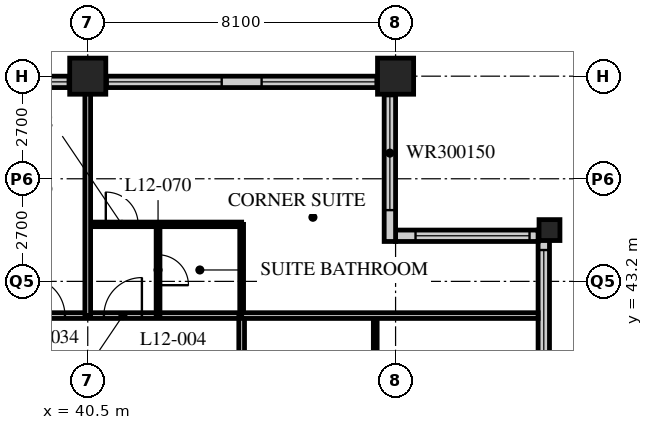
"""IFC4 building model, lengths in metres.
Left out: names, types, materials, properties, quantities, classifications, styles, units other than length and angle.
Written with IfcOpenShell. Run it as: python <this file> out.ifc"""

import sys

from ifc_helpers import new_model, si_unit, direction, frame, frame_2d, origin, origin_2d, place, context, subcontext, project, spatial, rectangle, hollow_rectangle, extrude, element, fill, save


model = new_model("IFC4")
c1 = context("Model", 3, precision=1e-05, world=origin(), true_north=direction((0.0, 1.0)))
c2 = subcontext(c1, "Body", "Model", "MODEL_VIEW")
j1 = project(units=[si_unit("LENGTHUNIT", "METRE"), si_unit("PLANEANGLEUNIT", "RADIAN")], contexts=[c1])
p1 = place(None, origin())
s1 = spatial("IfcSite", under=j1, at=p1, CompositionType="ELEMENT")
p2 = place(p1, origin())
s2 = spatial("IfcBuilding", under=s1, at=p2, CompositionType="ELEMENT")
p3 = place(p2, frame((0.0, 0.0, 53.4)))
s3 = spatial("IfcBuildingStorey", under=s2, at=p3, CompositionType="ELEMENT", Elevation=53.4)
for number, where, z_axis, x_axis in (
    (1, (40.5, 48.6, 0.0), (0.0, 0.0, 1.0), (1.0, 0.0, 0.0)),
    (2, (48.6, 48.6, 0.0), (0.0, 0.0, 1.0), (1.0, 0.0, 0.0)),
):
    element("IfcColumn", number, at=place(p3, frame(where, z_axis=z_axis, x_axis=x_axis)), inside=s3, PredefinedType="COLUMN", context=c2, shape_type="SweptSolid", body=[
        extrude(hollow_rectangle(XDim=0.95, YDim=0.95, WallThickness=0.095, at=origin_2d()), origin(), (0.0, 0.0, 1.0), 3.4),
    ])
p4 = place(p3, frame((52.65, 44.55, 0.0), z_axis=(0.0, 0.0, 1.0), x_axis=(1.0, 0.0, 0.0)))
e3 = element("IfcColumn", 3, at=p4, inside=s3, PredefinedType="COLUMN", context=c2, shape_type="SweptSolid", body=[
    extrude(hollow_rectangle(XDim=0.55, YDim=0.55, WallThickness=0.05, at=origin_2d()), origin(), (0.0, 0.0, 1.0), 3.4),
])
p5 = place(p3, frame((52.5, 40.2, 0.0), z_axis=(0.0, 0.0, 1.0), x_axis=(0.0, 1.0, 0.0)))
e4 = element("IfcWall", 4, at=p5, inside=s3, PredefinedType="SOLIDWALL", context=c2, shape_type="SweptSolid", body=[
    extrude(rectangle(XDim=4.35, YDim=0.3, at=frame_2d((2.175, 0.0))), origin(), (0.0, 0.0, 1.0), 3.19),
])
p6 = place(p5, frame((0.825, 0.0, 0.9)))
e5 = element("IfcOpeningElement", 5, at=p6, cuts=e4, PredefinedType="OPENING", context=c2, shape_type="SweptSolid", body=[
    extrude(rectangle(XDim=3.0, YDim=1.5, at=frame_2d((1.5, 0.75))), frame((0.0, 0.16, 0.0), z_axis=(0.0, -1.0, 0.0), x_axis=(1.0, 0.0, 0.0)), (0.0, 0.0, 1.0), 0.32),
])
p7 = place(p3, frame((52.35, 44.4, 0.0), z_axis=(0.0, 0.0, 1.0), x_axis=(-1.0, 0.0, 0.0)))
e6 = element("IfcWall", 6, at=p7, inside=s3, PredefinedType="SOLIDWALL", context=c2, shape_type="SweptSolid", body=[
    extrude(rectangle(XDim=3.75, YDim=0.3, at=frame_2d((1.875, 0.0))), origin(), (0.0, 0.0, 1.0), 3.19),
])
p8 = place(p7, frame((0.225, 0.0, 0.9)))
e7 = element("IfcOpeningElement", 7, at=p8, cuts=e6, PredefinedType="OPENING", context=c2, shape_type="SweptSolid", body=[
    extrude(rectangle(XDim=3.0, YDim=1.5, at=frame_2d((1.5, 0.75))), frame((0.0, 0.16, 0.0), z_axis=(0.0, -1.0, 0.0), x_axis=(1.0, 0.0, 0.0)), (0.0, 0.0, 1.0), 0.32),
])
p9 = place(p3, frame((48.45, 44.25, 0.0), z_axis=(0.0, 0.0, 1.0), x_axis=(0.0, 1.0, 0.0)))
e8 = element("IfcWall", 8, at=p9, inside=s3, PredefinedType="SOLIDWALL", context=c2, shape_type="SweptSolid", body=[
    extrude(rectangle(XDim=4.35, YDim=0.3, at=frame_2d((2.175, 0.0))), origin(), (0.0, 0.0, 1.0), 3.19),
])
p10 = place(p9, frame((0.825, 0.0, 0.9)))
e9 = element("IfcOpeningElement", 9, at=p10, cuts=e8, PredefinedType="OPENING", context=c2, shape_type="SweptSolid", body=[
    extrude(rectangle(XDim=3.0, YDim=1.5, at=frame_2d((1.5, 0.75))), frame((0.0, 0.16, 0.0), z_axis=(0.0, -1.0, 0.0), x_axis=(1.0, 0.0, 0.0)), (0.0, 0.0, 1.0), 0.32),
])
p11 = place(p3, frame((48.3, 48.45, 0.0), z_axis=(0.0, 0.0, 1.0), x_axis=(-1.0, 0.0, 0.0)))
e10 = element("IfcWall", 10, at=p11, inside=s3, PredefinedType="SOLIDWALL", context=c2, shape_type="SweptSolid", body=[
    extrude(rectangle(XDim=40.2, YDim=0.3, at=frame_2d((20.1, 0.0))), origin(), (0.0, 0.0, 1.0), 3.19),
])
p12 = place(p11, frame((0.225, 0.0, 0.9)))
e11 = element("IfcOpeningElement", 11, at=p12, cuts=e10, PredefinedType="OPENING", context=c2, shape_type="SweptSolid", body=[
    extrude(rectangle(XDim=3.0, YDim=2.0, at=frame_2d((1.5, 1.0))), frame((0.0, 0.16, 0.0), z_axis=(0.0, -1.0, 0.0), x_axis=(1.0, 0.0, 0.0)), (0.0, 0.0, 1.0), 0.32),
])
p13 = place(p11, frame((4.275, 0.0, 0.9)))
e12 = element("IfcOpeningElement", 12, at=p13, cuts=e10, PredefinedType="OPENING", context=c2, shape_type="SweptSolid", body=[
    extrude(rectangle(XDim=3.0, YDim=2.0, at=frame_2d((1.5, 1.0))), frame((0.0, 0.16, 0.0), z_axis=(0.0, -1.0, 0.0), x_axis=(1.0, 0.0, 0.0)), (0.0, 0.0, 1.0), 0.32),
])
p14 = place(p11, frame((8.325, 0.0, 0.9)))
e13 = element("IfcOpeningElement", 13, at=p14, cuts=e10, PredefinedType="OPENING", context=c2, shape_type="SweptSolid", body=[
    extrude(rectangle(XDim=3.0, YDim=2.0, at=frame_2d((1.5, 1.0))), frame((0.0, 0.16, 0.0), z_axis=(0.0, -1.0, 0.0), x_axis=(1.0, 0.0, 0.0)), (0.0, 0.0, 1.0), 0.32),
])
p15 = place(p11, frame((12.375, 0.0, 0.9)))
e14 = element("IfcOpeningElement", 14, at=p15, cuts=e10, PredefinedType="OPENING", context=c2, shape_type="SweptSolid", body=[
    extrude(rectangle(XDim=3.0, YDim=2.0, at=frame_2d((1.5, 1.0))), frame((0.0, 0.16, 0.0), z_axis=(0.0, -1.0, 0.0), x_axis=(1.0, 0.0, 0.0)), (0.0, 0.0, 1.0), 0.32),
])
p16 = place(p11, frame((16.425, 0.0, 0.9)))
e15 = element("IfcOpeningElement", 15, at=p16, cuts=e10, PredefinedType="OPENING", context=c2, shape_type="SweptSolid", body=[
    extrude(rectangle(XDim=3.0, YDim=2.0, at=frame_2d((1.5, 1.0))), frame((0.0, 0.16, 0.0), z_axis=(0.0, -1.0, 0.0), x_axis=(1.0, 0.0, 0.0)), (0.0, 0.0, 1.0), 0.32),
])
p17 = place(p11, frame((20.475, 0.0, 0.9)))
e16 = element("IfcOpeningElement", 16, at=p17, cuts=e10, PredefinedType="OPENING", context=c2, shape_type="SweptSolid", body=[
    extrude(rectangle(XDim=3.0, YDim=2.0, at=frame_2d((1.5, 1.0))), frame((0.0, 0.16, 0.0), z_axis=(0.0, -1.0, 0.0), x_axis=(1.0, 0.0, 0.0)), (0.0, 0.0, 1.0), 0.32),
])
p18 = place(p11, frame((24.525, 0.0, 0.9)))
e17 = element("IfcOpeningElement", 17, at=p18, cuts=e10, PredefinedType="OPENING", context=c2, shape_type="SweptSolid", body=[
    extrude(rectangle(XDim=3.0, YDim=2.0, at=frame_2d((1.5, 1.0))), frame((0.0, 0.16, 0.0), z_axis=(0.0, -1.0, 0.0), x_axis=(1.0, 0.0, 0.0)), (0.0, 0.0, 1.0), 0.32),
])
p19 = place(p11, frame((28.575, 0.0, 0.9)))
e18 = element("IfcOpeningElement", 18, at=p19, cuts=e10, PredefinedType="OPENING", context=c2, shape_type="SweptSolid", body=[
    extrude(rectangle(XDim=3.0, YDim=2.0, at=frame_2d((1.5, 1.0))), frame((0.0, 0.16, 0.0), z_axis=(0.0, -1.0, 0.0), x_axis=(1.0, 0.0, 0.0)), (0.0, 0.0, 1.0), 0.32),
])
p20 = place(p11, frame((32.625, 0.0, 0.9)))
e19 = element("IfcOpeningElement", 19, at=p20, cuts=e10, PredefinedType="OPENING", context=c2, shape_type="SweptSolid", body=[
    extrude(rectangle(XDim=3.0, YDim=2.0, at=frame_2d((1.5, 1.0))), frame((0.0, 0.16, 0.0), z_axis=(0.0, -1.0, 0.0), x_axis=(1.0, 0.0, 0.0)), (0.0, 0.0, 1.0), 0.32),
])
p21 = place(p11, frame((36.675, 0.0, 0.9)))
e20 = element("IfcOpeningElement", 20, at=p21, cuts=e10, PredefinedType="OPENING", context=c2, shape_type="SweptSolid", body=[
    extrude(rectangle(XDim=3.0, YDim=2.0, at=frame_2d((1.5, 1.0))), frame((0.0, 0.16, 0.0), z_axis=(0.0, -1.0, 0.0), x_axis=(1.0, 0.0, 0.0)), (0.0, 0.0, 1.0), 0.32),
])
p22 = place(p3, frame((12.15, 42.3, 0.0), z_axis=(0.0, 0.0, 1.0), x_axis=(1.0, 0.0, 0.0)))
e21 = element("IfcWall", 21, at=p22, inside=s3, PredefinedType="PARTITIONING", context=c2, shape_type="SweptSolid", body=[
    extrude(rectangle(XDim=32.4, YDim=0.15, at=frame_2d((16.2, 0.0))), origin(), (0.0, 0.0, 1.0), 3.19),
])
p23 = place(p22, frame((6.5, 0.0, 0.0)))
e22 = element("IfcOpeningElement", 22, at=p23, cuts=e21, PredefinedType="OPENING", context=c2, shape_type="SweptSolid", body=[
    extrude(rectangle(XDim=1.0, YDim=2.1, at=frame_2d((0.5, 1.05))), frame((0.0, 0.085, 0.0), z_axis=(0.0, -1.0, 0.0), x_axis=(1.0, 0.0, 0.0)), (0.0, 0.0, 1.0), 0.17),
])
p24 = place(p22, frame((10.55, 0.0, 0.0)))
e23 = element("IfcOpeningElement", 23, at=p24, cuts=e21, PredefinedType="OPENING", context=c2, shape_type="SweptSolid", body=[
    extrude(rectangle(XDim=1.0, YDim=2.1, at=frame_2d((0.5, 1.05))), frame((0.0, 0.085, 0.0), z_axis=(0.0, -1.0, 0.0), x_axis=(1.0, 0.0, 0.0)), (0.0, 0.0, 1.0), 0.17),
])
p25 = place(p22, frame((14.6, 0.0, 0.0)))
e24 = element("IfcOpeningElement", 24, at=p25, cuts=e21, PredefinedType="OPENING", context=c2, shape_type="SweptSolid", body=[
    extrude(rectangle(XDim=1.0, YDim=2.1, at=frame_2d((0.5, 1.05))), frame((0.0, 0.085, 0.0), z_axis=(0.0, -1.0, 0.0), x_axis=(1.0, 0.0, 0.0)), (0.0, 0.0, 1.0), 0.17),
])
p26 = place(p22, frame((18.65, 0.0, 0.0)))
e25 = element("IfcOpeningElement", 25, at=p26, cuts=e21, PredefinedType="OPENING", context=c2, shape_type="SweptSolid", body=[
    extrude(rectangle(XDim=1.0, YDim=2.1, at=frame_2d((0.5, 1.05))), frame((0.0, 0.085, 0.0), z_axis=(0.0, -1.0, 0.0), x_axis=(1.0, 0.0, 0.0)), (0.0, 0.0, 1.0), 0.17),
])
p27 = place(p22, frame((22.7, 0.0, 0.0)))
e26 = element("IfcOpeningElement", 26, at=p27, cuts=e21, PredefinedType="OPENING", context=c2, shape_type="SweptSolid", body=[
    extrude(rectangle(XDim=1.0, YDim=2.1, at=frame_2d((0.5, 1.05))), frame((0.0, 0.085, 0.0), z_axis=(0.0, -1.0, 0.0), x_axis=(1.0, 0.0, 0.0)), (0.0, 0.0, 1.0), 0.17),
])
p28 = place(p22, frame((26.75, 0.0, 0.0)))
e27 = element("IfcOpeningElement", 27, at=p28, cuts=e21, PredefinedType="OPENING", context=c2, shape_type="SweptSolid", body=[
    extrude(rectangle(XDim=1.0, YDim=2.1, at=frame_2d((0.5, 1.05))), frame((0.0, 0.085, 0.0), z_axis=(0.0, -1.0, 0.0), x_axis=(1.0, 0.0, 0.0)), (0.0, 0.0, 1.0), 0.17),
])
p29 = place(p22, frame((28.775, 0.0, 0.0)))
e28 = element("IfcOpeningElement", 28, at=p29, cuts=e21, PredefinedType="OPENING", context=c2, shape_type="SweptSolid", body=[
    extrude(rectangle(XDim=1.0, YDim=2.1, at=frame_2d((0.5, 1.05))), frame((0.0, 0.085, 0.0), z_axis=(0.0, -1.0, 0.0), x_axis=(1.0, 0.0, 0.0)), (0.0, 0.0, 1.0), 0.17),
])
p30 = place(p22, frame((2.625, 0.0, 0.0)))
e29 = element("IfcOpeningElement", 29, at=p30, cuts=e21, PredefinedType="OPENING", context=c2, shape_type="SweptSolid", body=[
    extrude(rectangle(XDim=1.0, YDim=2.1, at=frame_2d((0.5, 1.05))), frame((0.0, 0.085, 0.0), z_axis=(0.0, -1.0, 0.0), x_axis=(1.0, 0.0, 0.0)), (0.0, 0.0, 1.0), 0.17),
])
p31 = place(p3, frame((44.55, 12.15, 0.0), z_axis=(0.0, 0.0, 1.0), x_axis=(0.0, 1.0, 0.0)))
e30 = element("IfcWall", 30, at=p31, inside=s3, PredefinedType="PARTITIONING", context=c2, shape_type="SweptSolid", body=[
    extrude(rectangle(XDim=30.15, YDim=0.15, at=frame_2d((15.075, 0.0))), origin(), (0.0, 0.0, 1.0), 3.19),
])
p32 = place(p31, frame((2.75, 0.0, 0.0)))
e31 = element("IfcOpeningElement", 31, at=p32, cuts=e30, PredefinedType="OPENING", context=c2, shape_type="SweptSolid", body=[
    extrude(rectangle(XDim=1.0, YDim=2.1, at=frame_2d((0.5, 1.05))), frame((0.0, 0.085, 0.0), z_axis=(0.0, -1.0, 0.0), x_axis=(1.0, 0.0, 0.0)), (0.0, 0.0, 1.0), 0.17),
])
p33 = place(p31, frame((6.5, 0.0, 0.0)))
e32 = element("IfcOpeningElement", 32, at=p33, cuts=e30, PredefinedType="OPENING", context=c2, shape_type="SweptSolid", body=[
    extrude(rectangle(XDim=1.0, YDim=2.1, at=frame_2d((0.5, 1.05))), frame((0.0, 0.085, 0.0), z_axis=(0.0, -1.0, 0.0), x_axis=(1.0, 0.0, 0.0)), (0.0, 0.0, 1.0), 0.17),
])
p34 = place(p31, frame((10.55, 0.0, 0.0)))
e33 = element("IfcOpeningElement", 33, at=p34, cuts=e30, PredefinedType="OPENING", context=c2, shape_type="SweptSolid", body=[
    extrude(rectangle(XDim=1.0, YDim=2.1, at=frame_2d((0.5, 1.05))), frame((0.0, 0.085, 0.0), z_axis=(0.0, -1.0, 0.0), x_axis=(1.0, 0.0, 0.0)), (0.0, 0.0, 1.0), 0.17),
])
p35 = place(p31, frame((14.6, 0.0, 0.0)))
e34 = element("IfcOpeningElement", 34, at=p35, cuts=e30, PredefinedType="OPENING", context=c2, shape_type="SweptSolid", body=[
    extrude(rectangle(XDim=1.0, YDim=2.1, at=frame_2d((0.5, 1.05))), frame((0.0, 0.085, 0.0), z_axis=(0.0, -1.0, 0.0), x_axis=(1.0, 0.0, 0.0)), (0.0, 0.0, 1.0), 0.17),
])
p36 = place(p31, frame((18.65, 0.0, 0.0)))
e35 = element("IfcOpeningElement", 35, at=p36, cuts=e30, PredefinedType="OPENING", context=c2, shape_type="SweptSolid", body=[
    extrude(rectangle(XDim=1.0, YDim=2.1, at=frame_2d((0.5, 1.05))), frame((0.0, 0.085, 0.0), z_axis=(0.0, -1.0, 0.0), x_axis=(1.0, 0.0, 0.0)), (0.0, 0.0, 1.0), 0.17),
])
p37 = place(p31, frame((22.7, 0.0, 0.0)))
e36 = element("IfcOpeningElement", 36, at=p37, cuts=e30, PredefinedType="OPENING", context=c2, shape_type="SweptSolid", body=[
    extrude(rectangle(XDim=1.0, YDim=2.1, at=frame_2d((0.5, 1.05))), frame((0.0, 0.085, 0.0), z_axis=(0.0, -1.0, 0.0), x_axis=(1.0, 0.0, 0.0)), (0.0, 0.0, 1.0), 0.17),
])
p38 = place(p31, frame((26.7, 0.0, 0.0)))
e37 = element("IfcOpeningElement", 37, at=p38, cuts=e30, PredefinedType="OPENING", context=c2, shape_type="SweptSolid", body=[
    extrude(rectangle(XDim=1.0, YDim=2.1, at=frame_2d((0.5, 1.05))), frame((0.0, 0.085, 0.0), z_axis=(0.0, -1.0, 0.0), x_axis=(1.0, 0.0, 0.0)), (0.0, 0.0, 1.0), 0.17),
])
p39 = place(p3, frame((48.065, 40.0, 0.0), z_axis=(0.0, 0.0, 1.0), x_axis=(0.0, 1.0, 0.0)))
e38 = element("IfcWall", 38, at=p39, inside=s3, PredefinedType="PARTITIONING", context=c2, shape_type="SweptSolid", body=[
    extrude(rectangle(XDim=2.3, YDim=0.1, at=frame_2d((1.15, 0.0))), origin(), (0.0, 0.0, 1.0), 3.19),
])
p40 = place(p3, frame((40.5, 44.7, 0.0), z_axis=(0.0, 0.0, 1.0), x_axis=(1.0, 0.0, 0.0)))
e39 = element("IfcWall", 39, at=p40, inside=s3, PredefinedType="PARTITIONING", context=c2, shape_type="SweptSolid", body=[
    extrude(rectangle(XDim=4.05, YDim=0.12, at=frame_2d((2.025, 0.0))), origin(), (0.0, 0.0, 1.0), 3.19),
])
p41 = place(p40, frame((0.475, 0.0, 0.0)))
e40 = element("IfcOpeningElement", 40, at=p41, cuts=e39, PredefinedType="OPENING", context=c2, shape_type="SweptSolid", body=[
    extrude(rectangle(XDim=0.85, YDim=2.1, at=frame_2d((0.425, 1.05))), frame((0.0, 0.07, 0.0), z_axis=(0.0, -1.0, 0.0), x_axis=(1.0, 0.0, 0.0)), (0.0, 0.0, 1.0), 0.14),
])
p42 = place(p3, frame((42.35, 42.3, 0.0), z_axis=(0.0, 0.0, 1.0), x_axis=(0.0, 1.0, 0.0)))
e41 = element("IfcWall", 41, at=p42, inside=s3, PredefinedType="PARTITIONING", context=c2, shape_type="SweptSolid", body=[
    extrude(rectangle(XDim=2.4, YDim=0.1, at=frame_2d((1.2, 0.0))), origin(), (0.0, 0.0, 1.0), 3.19),
])
p43 = place(p42, frame((0.8, 0.0, 0.0)))
e42 = element("IfcOpeningElement", 42, at=p43, cuts=e41, PredefinedType="OPENING", context=c2, shape_type="SweptSolid", body=[
    extrude(rectangle(XDim=0.8, YDim=2.1, at=frame_2d((0.4, 1.05))), frame((0.0, 0.06, 0.0), z_axis=(0.0, -1.0, 0.0), x_axis=(1.0, 0.0, 0.0)), (0.0, 0.0, 1.0), 0.12),
])
p44 = place(p3, frame((44.55, 42.3, 0.0), z_axis=(0.0, 0.0, 1.0), x_axis=(0.0, 1.0, 0.0)))
e43 = element("IfcWall", 43, at=p44, inside=s3, PredefinedType="PARTITIONING", context=c2, shape_type="SweptSolid", body=[
    extrude(rectangle(XDim=2.4, YDim=0.1, at=frame_2d((1.2, 0.0))), origin(), (0.0, 0.0, 1.0), 3.19),
])
p45 = place(p3, frame((44.55, 42.3, 0.0), z_axis=(0.0, 0.0, 1.0), x_axis=(1.0, 0.0, 0.0)))
e44 = element("IfcWall", 44, at=p45, inside=s3, PredefinedType="PARTITIONING", context=c2, shape_type="SweptSolid", body=[
    extrude(rectangle(XDim=7.8, YDim=0.15, at=frame_2d((3.9, 0.0))), origin(), (0.0, 0.0, 1.0), 3.19),
])
p46 = place(p3, frame((40.5, 42.3, 0.0), z_axis=(0.0, 0.0, 1.0), x_axis=(0.0, 1.0, 0.0)))
e45 = element("IfcWall", 45, at=p46, inside=s3, PredefinedType="PARTITIONING", context=c2, shape_type="SweptSolid", body=[
    extrude(rectangle(XDim=6.0, YDim=0.15, at=frame_2d((3.0, 0.0))), origin(), (0.0, 0.0, 1.0), 2.578),
])
p47 = place(p6, origin())
e46 = element("IfcWindow", 46, at=p47, inside=s3, PartitioningType="SINGLE_PANEL", PredefinedType="WINDOW", context=c2, shape_type="SweptSolid", body=[
    extrude(rectangle(XDim=3.0, YDim=1.5, at=frame_2d((1.5, 0.75))), frame((0.0, 0.03, 0.0), z_axis=(0.0, -1.0, 0.0), x_axis=(1.0, 0.0, 0.0)), (0.0, 0.0, 1.0), 0.06),
])
fill(e5, e46)
p48 = place(p8, origin())
e47 = element("IfcWindow", 47, at=p48, inside=s3, PartitioningType="SINGLE_PANEL", PredefinedType="WINDOW", context=c2, shape_type="SweptSolid", body=[
    extrude(rectangle(XDim=3.0, YDim=1.5, at=frame_2d((1.5, 0.75))), frame((0.0, 0.03, 0.0), z_axis=(0.0, -1.0, 0.0), x_axis=(1.0, 0.0, 0.0)), (0.0, 0.0, 1.0), 0.06),
])
fill(e7, e47)
p49 = place(p10, origin())
e48 = element("IfcWindow", 48, at=p49, inside=s3, PartitioningType="SINGLE_PANEL", PredefinedType="WINDOW", context=c2, shape_type="SweptSolid", body=[
    extrude(rectangle(XDim=3.0, YDim=1.5, at=frame_2d((1.5, 0.75))), frame((0.0, 0.03, 0.0), z_axis=(0.0, -1.0, 0.0), x_axis=(1.0, 0.0, 0.0)), (0.0, 0.0, 1.0), 0.06),
])
fill(e9, e48)
p50 = place(p12, origin())
e49 = element("IfcWindow", 49, at=p50, inside=s3, PartitioningType="SINGLE_PANEL", PredefinedType="WINDOW", context=c2, shape_type="SweptSolid", body=[
    extrude(rectangle(XDim=3.0, YDim=2.0, at=frame_2d((1.5, 1.0))), frame((0.0, 0.03, 0.0), z_axis=(0.0, -1.0, 0.0), x_axis=(1.0, 0.0, 0.0)), (0.0, 0.0, 1.0), 0.06),
])
fill(e11, e49)
p51 = place(p13, origin())
e50 = element("IfcWindow", 50, at=p51, inside=s3, PartitioningType="SINGLE_PANEL", PredefinedType="WINDOW", context=c2, shape_type="SweptSolid", body=[
    extrude(rectangle(XDim=3.0, YDim=2.0, at=frame_2d((1.5, 1.0))), frame((0.0, 0.03, 0.0), z_axis=(0.0, -1.0, 0.0), x_axis=(1.0, 0.0, 0.0)), (0.0, 0.0, 1.0), 0.06),
])
fill(e12, e50)
p52 = place(p14, origin())
e51 = element("IfcWindow", 51, at=p52, inside=s3, PartitioningType="SINGLE_PANEL", PredefinedType="WINDOW", context=c2, shape_type="SweptSolid", body=[
    extrude(rectangle(XDim=3.0, YDim=2.0, at=frame_2d((1.5, 1.0))), frame((0.0, 0.03, 0.0), z_axis=(0.0, -1.0, 0.0), x_axis=(1.0, 0.0, 0.0)), (0.0, 0.0, 1.0), 0.06),
])
fill(e13, e51)
p53 = place(p28, origin())
e52 = element("IfcDoor", 52, at=p53, inside=s3, OperationType="SINGLE_SWING_LEFT", PredefinedType="DOOR", context=c2, shape_type="SweptSolid", body=[
    extrude(rectangle(XDim=1.0, YDim=2.1, at=frame_2d((0.5, 1.05))), frame((0.0, 0.025, 0.0), z_axis=(0.0, -1.0, 0.0), x_axis=(1.0, 0.0, 0.0)), (0.0, 0.0, 1.0), 0.05),
])
fill(e27, e52)
p54 = place(p43, origin())
e53 = element("IfcDoor", 53, at=p54, inside=s3, OperationType="SINGLE_SWING_RIGHT", PredefinedType="DOOR", context=c2, shape_type="SweptSolid", body=[
    extrude(rectangle(XDim=0.8, YDim=2.1, at=frame_2d((0.4, 1.05))), frame((0.0, 0.025, 0.0), z_axis=(0.0, -1.0, 0.0), x_axis=(1.0, 0.0, 0.0)), (0.0, 0.0, 1.0), 0.05),
])
fill(e42, e53)
p55 = place(p29, origin())
e54 = element("IfcDoor", 54, at=p55, inside=s3, OperationType="SINGLE_SWING_RIGHT", PredefinedType="DOOR", context=c2, shape_type="SweptSolid", body=[
    extrude(rectangle(XDim=1.0, YDim=2.1, at=frame_2d((0.5, 1.05))), frame((0.0, 0.025, 0.0), z_axis=(0.0, -1.0, 0.0), x_axis=(1.0, 0.0, 0.0)), (0.0, 0.0, 1.0), 0.05),
])
fill(e28, e54)
p56 = place(p41, origin())
e55 = element("IfcDoor", 55, at=p56, inside=s3, OperationType="SINGLE_SWING_LEFT", PredefinedType="DOOR", context=c2, shape_type="SweptSolid", body=[
    extrude(rectangle(XDim=0.85, YDim=2.1, at=frame_2d((0.425, 1.05))), frame((0.0, 0.025, 0.0), z_axis=(0.0, -1.0, 0.0), x_axis=(1.0, 0.0, 0.0)), (0.0, 0.0, 1.0), 0.05),
])
fill(e40, e55)
save(model, sys.argv[1])
